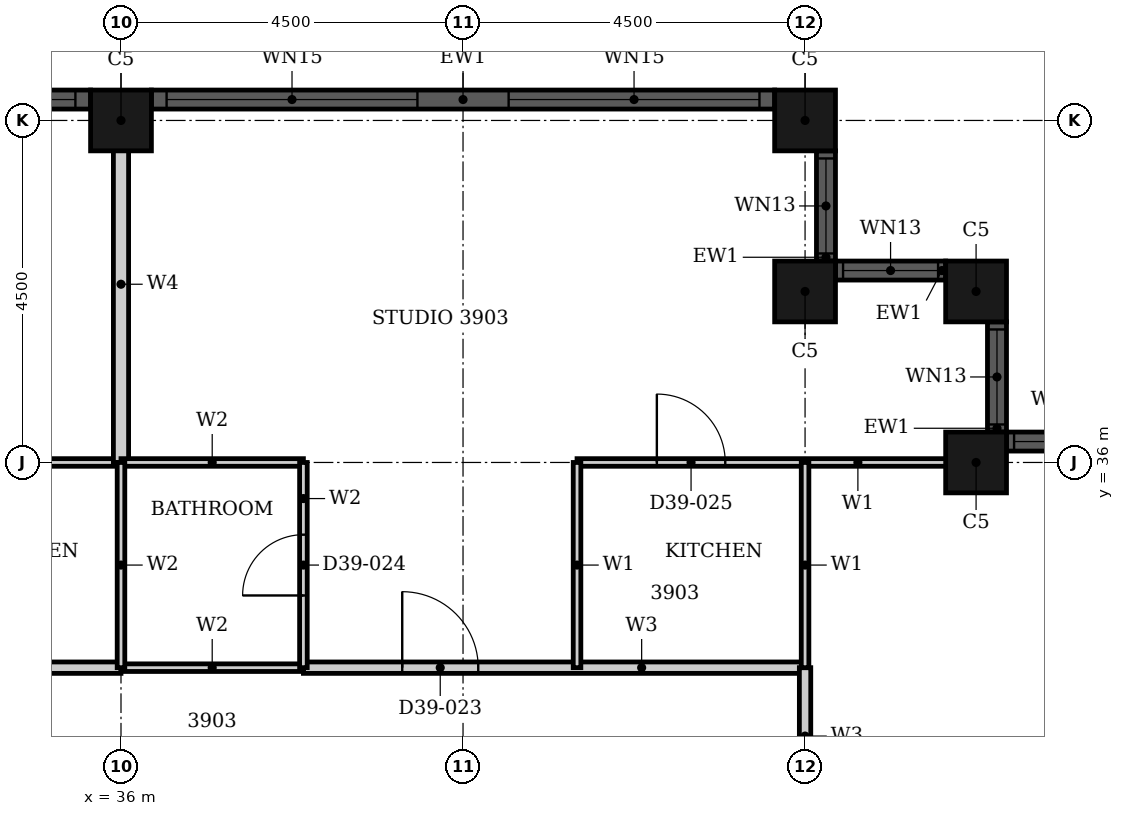
"""IFC4 building model, lengths in metres.
Left out: names, types, materials, properties, quantities, classifications, styles, units other than length and angle.
Written with IfcOpenShell. Run it as: python <this file> out.ifc"""

import sys

from ifc_helpers import new_model, si_unit, direction, frame, frame_2d, origin, origin_2d, place, context, subcontext, project, spatial, rectangle, hollow_rectangle, extrude, element, fill, save


model = new_model("IFC4")
c1 = context("Model", 3, precision=1e-05, world=origin(), true_north=direction((0.0, 1.0)))
c2 = subcontext(c1, "Body", "Model", "MODEL_VIEW")
j1 = project(units=[si_unit("LENGTHUNIT", "METRE"), si_unit("PLANEANGLEUNIT", "RADIAN")], contexts=[c1])
p1 = place(None, origin())
s1 = spatial("IfcSite", under=j1, at=p1, CompositionType="ELEMENT")
p2 = place(p1, origin())
s2 = spatial("IfcBuilding", under=s1, at=p2, CompositionType="ELEMENT")
p3 = place(p2, frame((0.0, 0.0, 158.0)))
s3 = spatial("IfcBuildingStorey", under=s2, at=p3, CompositionType="ELEMENT", Elevation=158.0)
for number, where, z_axis, x_axis in (
    (1, (47.25, 36.0, 0.0), (0.0, 0.0, 1.0), (1.0, 0.0, 0.0)),
    (2, (47.25, 38.25, 0.0), (0.0, 0.0, 1.0), (1.0, 0.0, 0.0)),
    (3, (45.0, 38.25, 0.0), (0.0, 0.0, 1.0), (1.0, 0.0, 0.0)),
    (4, (45.0, 40.5, 0.0), (0.0, 0.0, 1.0), (1.0, 0.0, 0.0)),
    (5, (36.0, 40.5, 0.0), (0.0, 0.0, 1.0), (1.0, 0.0, 0.0)),
):
    element("IfcColumn", number, at=place(p3, frame(where, z_axis=z_axis, x_axis=x_axis)), inside=s3, PredefinedType="COLUMN", context=c2, shape_type="SweptSolid", body=[
        extrude(hollow_rectangle(XDim=0.8, YDim=0.8, WallThickness=0.025, at=origin_2d()), origin(), (0.0, 0.0, 1.0), 3.7),
    ])
p4 = place(p3, frame((49.1, 36.275, 0.0), z_axis=(0.0, 0.0, 1.0), x_axis=(-1.0, 0.0, 0.0)))
e6 = element("IfcWall", 6, at=p4, inside=s3, PredefinedType="SOLIDWALL", context=c2, shape_type="SweptSolid", body=[
    extrude(rectangle(XDim=1.45, YDim=0.25, at=frame_2d((0.725, 0.0))), origin(), (0.0, 0.0, 1.0), 3.7),
])
p5 = place(p4, frame((0.1, 0.0, 0.9)))
e7 = element("IfcOpeningElement", 7, at=p5, cuts=e6, PredefinedType="OPENING", context=c2, shape_type="SweptSolid", body=[
    extrude(rectangle(XDim=1.25, YDim=1.85, at=frame_2d((0.625, 0.925))), frame((0.0, 0.135, 0.0), z_axis=(0.0, -1.0, 0.0), x_axis=(1.0, 0.0, 0.0)), (0.0, 0.0, 1.0), 0.27),
])
p6 = place(p3, frame((47.525, 36.4, 0.0), z_axis=(0.0, 0.0, 1.0), x_axis=(0.0, 1.0, 0.0)))
e8 = element("IfcWall", 8, at=p6, inside=s3, PredefinedType="SOLIDWALL", context=c2, shape_type="SweptSolid", body=[
    extrude(rectangle(XDim=1.45, YDim=0.25, at=frame_2d((0.725, 0.0))), origin(), (0.0, 0.0, 1.0), 3.7),
])
p7 = place(p6, frame((0.1, 0.0, 0.9)))
e9 = element("IfcOpeningElement", 9, at=p7, cuts=e8, PredefinedType="OPENING", context=c2, shape_type="SweptSolid", body=[
    extrude(rectangle(XDim=1.25, YDim=1.85, at=frame_2d((0.625, 0.925))), frame((0.0, 0.135, 0.0), z_axis=(0.0, -1.0, 0.0), x_axis=(1.0, 0.0, 0.0)), (0.0, 0.0, 1.0), 0.27),
])
p8 = place(p3, frame((46.85, 38.525, 0.0), z_axis=(0.0, 0.0, 1.0), x_axis=(-1.0, 0.0, 0.0)))
e10 = element("IfcWall", 10, at=p8, inside=s3, PredefinedType="SOLIDWALL", context=c2, shape_type="SweptSolid", body=[
    extrude(rectangle(XDim=1.45, YDim=0.25, at=frame_2d((0.725, 0.0))), origin(), (0.0, 0.0, 1.0), 3.7),
])
p9 = place(p8, frame((0.1, 0.0, 0.9)))
e11 = element("IfcOpeningElement", 11, at=p9, cuts=e10, PredefinedType="OPENING", context=c2, shape_type="SweptSolid", body=[
    extrude(rectangle(XDim=1.25, YDim=1.85, at=frame_2d((0.625, 0.925))), frame((0.0, 0.135, 0.0), z_axis=(0.0, -1.0, 0.0), x_axis=(1.0, 0.0, 0.0)), (0.0, 0.0, 1.0), 0.27),
])
p10 = place(p3, frame((45.275, 38.65, 0.0), z_axis=(0.0, 0.0, 1.0), x_axis=(0.0, 1.0, 0.0)))
e12 = element("IfcWall", 12, at=p10, inside=s3, PredefinedType="SOLIDWALL", context=c2, shape_type="SweptSolid", body=[
    extrude(rectangle(XDim=1.45, YDim=0.25, at=frame_2d((0.725, 0.0))), origin(), (0.0, 0.0, 1.0), 3.7),
])
p11 = place(p10, frame((0.1, 0.0, 0.9)))
e13 = element("IfcOpeningElement", 13, at=p11, cuts=e12, PredefinedType="OPENING", context=c2, shape_type="SweptSolid", body=[
    extrude(rectangle(XDim=1.25, YDim=1.85, at=frame_2d((0.625, 0.925))), frame((0.0, 0.135, 0.0), z_axis=(0.0, -1.0, 0.0), x_axis=(1.0, 0.0, 0.0)), (0.0, 0.0, 1.0), 0.27),
])
p12 = place(p3, frame((44.6, 40.775, 0.0), z_axis=(0.0, 0.0, 1.0), x_axis=(-1.0, 0.0, 0.0)))
e14 = element("IfcWall", 14, at=p12, inside=s3, PredefinedType="SOLIDWALL", context=c2, shape_type="SweptSolid", body=[
    extrude(rectangle(XDim=8.2, YDim=0.25, at=frame_2d((4.1, 0.0))), origin(), (0.0, 0.0, 1.0), 3.7),
])
p13 = place(p12, frame((0.2, 0.0, 0.45)))
e15 = element("IfcOpeningElement", 15, at=p13, cuts=e14, PredefinedType="OPENING", context=c2, shape_type="SweptSolid", body=[
    extrude(rectangle(XDim=3.3, YDim=2.3, at=frame_2d((1.65, 1.15))), frame((0.0, 0.135, 0.0), z_axis=(0.0, -1.0, 0.0), x_axis=(1.0, 0.0, 0.0)), (0.0, 0.0, 1.0), 0.27),
])
p14 = place(p12, frame((4.7, 0.0, 0.45)))
e16 = element("IfcOpeningElement", 16, at=p14, cuts=e14, PredefinedType="OPENING", context=c2, shape_type="SweptSolid", body=[
    extrude(rectangle(XDim=3.3, YDim=2.3, at=frame_2d((1.65, 1.15))), frame((0.0, 0.135, 0.0), z_axis=(0.0, -1.0, 0.0), x_axis=(1.0, 0.0, 0.0)), (0.0, 0.0, 1.0), 0.27),
])
p15 = place(p3, frame((35.6, 40.775, 0.0), z_axis=(0.0, 0.0, 1.0), x_axis=(-1.0, 0.0, 0.0)))
e17 = element("IfcWall", 17, at=p15, inside=s3, PredefinedType="SOLIDWALL", context=c2, shape_type="SweptSolid", body=[
    extrude(rectangle(XDim=8.2, YDim=0.25, at=frame_2d((4.1, 0.0))), origin(), (0.0, 0.0, 1.0), 3.7),
])
p16 = place(p15, frame((0.2, 0.0, 0.45)))
e18 = element("IfcOpeningElement", 18, at=p16, cuts=e17, PredefinedType="OPENING", context=c2, shape_type="SweptSolid", body=[
    extrude(rectangle(XDim=3.3, YDim=2.3, at=frame_2d((1.65, 1.15))), frame((0.0, 0.135, 0.0), z_axis=(0.0, -1.0, 0.0), x_axis=(1.0, 0.0, 0.0)), (0.0, 0.0, 1.0), 0.27),
])
p17 = place(p15, frame((4.7, 0.0, 0.45)))
e19 = element("IfcOpeningElement", 19, at=p17, cuts=e17, PredefinedType="OPENING", context=c2, shape_type="SweptSolid", body=[
    extrude(rectangle(XDim=3.3, YDim=2.3, at=frame_2d((1.65, 1.15))), frame((0.0, 0.135, 0.0), z_axis=(0.0, -1.0, 0.0), x_axis=(1.0, 0.0, 0.0)), (0.0, 0.0, 1.0), 0.27),
])
p18 = place(p3, frame((29.4, 33.3, 0.0), z_axis=(0.0, 0.0, 1.0), x_axis=(1.0, 0.0, 0.0)))
e20 = element("IfcWall", 20, at=p18, inside=s3, PredefinedType="PARTITIONING", context=c2, shape_type="SweptSolid", body=[
    extrude(rectangle(XDim=6.6, YDim=0.15, at=frame_2d((3.3, 0.0))), origin(), (0.0, 0.0, 1.0), 3.4),
])
p19 = place(p18, frame((1.3, 0.0, 0.0)))
e21 = element("IfcOpeningElement", 21, at=p19, cuts=e20, PredefinedType="OPENING", context=c2, shape_type="SweptSolid", body=[
    extrude(rectangle(XDim=1.0, YDim=2.2, at=frame_2d((0.5, 1.1))), frame((0.0, 0.085, 0.0), z_axis=(0.0, -1.0, 0.0), x_axis=(1.0, 0.0, 0.0)), (0.0, 0.0, 1.0), 0.17),
])
p20 = place(p3, frame((38.4, 33.3, 0.0), z_axis=(0.0, 0.0, 1.0), x_axis=(1.0, 0.0, 0.0)))
e22 = element("IfcWall", 22, at=p20, inside=s3, PredefinedType="PARTITIONING", context=c2, shape_type="SweptSolid", body=[
    extrude(rectangle(XDim=6.6, YDim=0.15, at=frame_2d((3.3, 0.0))), origin(), (0.0, 0.0, 1.0), 3.4),
])
p21 = place(p20, frame((1.3, 0.0, 0.0)))
e23 = element("IfcOpeningElement", 23, at=p21, cuts=e22, PredefinedType="OPENING", context=c2, shape_type="SweptSolid", body=[
    extrude(rectangle(XDim=1.0, YDim=2.2, at=frame_2d((0.5, 1.1))), frame((0.0, 0.085, 0.0), z_axis=(0.0, -1.0, 0.0), x_axis=(1.0, 0.0, 0.0)), (0.0, 0.0, 1.0), 0.17),
])
p22 = place(p3, frame((45.0, 31.5, 0.0), z_axis=(0.0, 0.0, 1.0), x_axis=(0.0, 1.0, 0.0)))
e24 = element("IfcWall", 24, at=p22, inside=s3, PredefinedType="PARTITIONING", context=c2, shape_type="SweptSolid", body=[
    extrude(rectangle(XDim=1.8, YDim=0.15, at=frame_2d((0.9, 0.0))), origin(), (0.0, 0.0, 1.0), 3.4),
])
p23 = place(p3, frame((33.0, 36.0, 0.0), z_axis=(0.0, 0.0, 1.0), x_axis=(1.0, 0.0, 0.0)))
e25 = element("IfcWall", 25, at=p23, inside=s3, PredefinedType="PARTITIONING", context=c2, shape_type="SweptSolid", body=[
    extrude(rectangle(XDim=3.0, YDim=0.1, at=frame_2d((1.5, 0.0))), origin(), (0.0, 0.0, 1.0), 3.4),
])
p24 = place(p23, frame((1.05, 0.0, 0.0)))
e26 = element("IfcOpeningElement", 26, at=p24, cuts=e25, PredefinedType="OPENING", context=c2, shape_type="SweptSolid", body=[
    extrude(rectangle(XDim=0.9, YDim=2.1, at=frame_2d((0.45, 1.05))), frame((0.0, 0.06, 0.0), z_axis=(0.0, -1.0, 0.0), x_axis=(1.0, 0.0, 0.0)), (0.0, 0.0, 1.0), 0.12),
])
p25 = place(p3, frame((42.0, 36.0, 0.0), z_axis=(0.0, 0.0, 1.0), x_axis=(1.0, 0.0, 0.0)))
e27 = element("IfcWall", 27, at=p25, inside=s3, PredefinedType="PARTITIONING", context=c2, shape_type="SweptSolid", body=[
    extrude(rectangle(XDim=5.44, YDim=0.1, at=frame_2d((2.72, 0.0))), origin(), (0.0, 0.0, 1.0), 3.4),
])
p26 = place(p25, frame((1.05, 0.0, 0.0)))
e28 = element("IfcOpeningElement", 28, at=p26, cuts=e27, PredefinedType="OPENING", context=c2, shape_type="SweptSolid", body=[
    extrude(rectangle(XDim=0.9, YDim=2.1, at=frame_2d((0.45, 1.05))), frame((0.0, 0.06, 0.0), z_axis=(0.0, -1.0, 0.0), x_axis=(1.0, 0.0, 0.0)), (0.0, 0.0, 1.0), 0.12),
])
for number, where, z_axis, x_axis in (
    (29, (42.0, 33.3, 0.0), (0.0, 0.0, 1.0), (0.0, 1.0, 0.0)),
    (30, (45.0, 33.3, 0.0), (0.0, 0.0, 1.0), (0.0, 1.0, 0.0)),
):
    element("IfcWall", number, at=place(p3, frame(where, z_axis=z_axis, x_axis=x_axis)), inside=s3, PredefinedType="PARTITIONING", context=c2, shape_type="SweptSolid", body=[
        extrude(rectangle(XDim=2.7, YDim=0.1, at=frame_2d((1.35, 0.0))), origin(), (0.0, 0.0, 1.0), 3.4),
    ])
p27 = place(p3, frame((36.0, 36.0, 0.0), z_axis=(0.0, 0.0, 1.0), x_axis=(0.0, 1.0, 0.0)))
e31 = element("IfcWall", 31, at=p27, inside=s3, PredefinedType="PARTITIONING", context=c2, shape_type="SweptSolid", body=[
    extrude(rectangle(XDim=4.69, YDim=0.2, at=frame_2d((2.345, 0.0))), origin(), (0.0, 0.0, 1.0), 3.4),
])
for number, where, z_axis, x_axis in (
    (32, (36.0, 33.3, 0.0), (0.0, 0.0, 1.0), (1.0, 0.0, 0.0)),
    (33, (36.0, 36.0, 0.0), (0.0, 0.0, 1.0), (1.0, 0.0, 0.0)),
):
    element("IfcWall", number, at=place(p3, frame(where, z_axis=z_axis, x_axis=x_axis)), inside=s3, PredefinedType="PARTITIONING", context=c2, shape_type="SweptSolid", body=[
        extrude(rectangle(XDim=2.4, YDim=0.1, at=frame_2d((1.2, 0.0))), origin(), (0.0, 0.0, 1.0), 3.4),
    ])
p28 = place(p3, frame((36.0, 33.3, 0.0), z_axis=(0.0, 0.0, 1.0), x_axis=(0.0, 1.0, 0.0)))
e34 = element("IfcWall", 34, at=p28, inside=s3, PredefinedType="PARTITIONING", context=c2, shape_type="SweptSolid", body=[
    extrude(rectangle(XDim=2.7, YDim=0.1, at=frame_2d((1.35, 0.0))), origin(), (0.0, 0.0, 1.0), 3.4),
])
p29 = place(p3, frame((38.4, 33.3, 0.0), z_axis=(0.0, 0.0, 1.0), x_axis=(0.0, 1.0, 0.0)))
e35 = element("IfcWall", 35, at=p29, inside=s3, PredefinedType="PARTITIONING", context=c2, shape_type="SweptSolid", body=[
    extrude(rectangle(XDim=2.7, YDim=0.1, at=frame_2d((1.35, 0.0))), origin(), (0.0, 0.0, 1.0), 3.4),
])
p30 = place(p29, frame((0.95, 0.0, 0.0)))
e36 = element("IfcOpeningElement", 36, at=p30, cuts=e35, PredefinedType="OPENING", context=c2, shape_type="SweptSolid", body=[
    extrude(rectangle(XDim=0.8, YDim=2.1, at=frame_2d((0.4, 1.05))), frame((0.0, 0.06, 0.0), z_axis=(0.0, -1.0, 0.0), x_axis=(1.0, 0.0, 0.0)), (0.0, 0.0, 1.0), 0.12),
])
p31 = place(p5, origin())
e37 = element("IfcWindow", 37, at=p31, inside=s3, PartitioningType="SINGLE_PANEL", PredefinedType="WINDOW", context=c2, shape_type="SweptSolid", body=[
    extrude(rectangle(XDim=1.25, YDim=1.85, at=frame_2d((0.625, 0.925))), frame((0.0, 0.03, 0.0), z_axis=(0.0, -1.0, 0.0), x_axis=(1.0, 0.0, 0.0)), (0.0, 0.0, 1.0), 0.06),
])
fill(e7, e37)
p32 = place(p7, origin())
e38 = element("IfcWindow", 38, at=p32, inside=s3, PartitioningType="SINGLE_PANEL", PredefinedType="WINDOW", context=c2, shape_type="SweptSolid", body=[
    extrude(rectangle(XDim=1.25, YDim=1.85, at=frame_2d((0.625, 0.925))), frame((0.0, 0.03, 0.0), z_axis=(0.0, -1.0, 0.0), x_axis=(1.0, 0.0, 0.0)), (0.0, 0.0, 1.0), 0.06),
])
fill(e9, e38)
p33 = place(p9, origin())
e39 = element("IfcWindow", 39, at=p33, inside=s3, PartitioningType="SINGLE_PANEL", PredefinedType="WINDOW", context=c2, shape_type="SweptSolid", body=[
    extrude(rectangle(XDim=1.25, YDim=1.85, at=frame_2d((0.625, 0.925))), frame((0.0, 0.03, 0.0), z_axis=(0.0, -1.0, 0.0), x_axis=(1.0, 0.0, 0.0)), (0.0, 0.0, 1.0), 0.06),
])
fill(e11, e39)
p34 = place(p11, origin())
e40 = element("IfcWindow", 40, at=p34, inside=s3, PartitioningType="SINGLE_PANEL", PredefinedType="WINDOW", context=c2, shape_type="SweptSolid", body=[
    extrude(rectangle(XDim=1.25, YDim=1.85, at=frame_2d((0.625, 0.925))), frame((0.0, 0.03, 0.0), z_axis=(0.0, -1.0, 0.0), x_axis=(1.0, 0.0, 0.0)), (0.0, 0.0, 1.0), 0.06),
])
fill(e13, e40)
p35 = place(p13, origin())
e41 = element("IfcWindow", 41, at=p35, inside=s3, PartitioningType="SINGLE_PANEL", PredefinedType="WINDOW", context=c2, shape_type="SweptSolid", body=[
    extrude(rectangle(XDim=3.3, YDim=2.3, at=frame_2d((1.65, 1.15))), frame((0.0, 0.03, 0.0), z_axis=(0.0, -1.0, 0.0), x_axis=(1.0, 0.0, 0.0)), (0.0, 0.0, 1.0), 0.06),
])
fill(e15, e41)
p36 = place(p14, origin())
e42 = element("IfcWindow", 42, at=p36, inside=s3, PartitioningType="SINGLE_PANEL", PredefinedType="WINDOW", context=c2, shape_type="SweptSolid", body=[
    extrude(rectangle(XDim=3.3, YDim=2.3, at=frame_2d((1.65, 1.15))), frame((0.0, 0.03, 0.0), z_axis=(0.0, -1.0, 0.0), x_axis=(1.0, 0.0, 0.0)), (0.0, 0.0, 1.0), 0.06),
])
fill(e16, e42)
p37 = place(p16, origin())
e43 = element("IfcWindow", 43, at=p37, inside=s3, PartitioningType="SINGLE_PANEL", PredefinedType="WINDOW", context=c2, shape_type="SweptSolid", body=[
    extrude(rectangle(XDim=3.3, YDim=2.3, at=frame_2d((1.65, 1.15))), frame((0.0, 0.03, 0.0), z_axis=(0.0, -1.0, 0.0), x_axis=(1.0, 0.0, 0.0)), (0.0, 0.0, 1.0), 0.06),
])
fill(e18, e43)
p38 = place(p21, origin())
e44 = element("IfcDoor", 44, at=p38, inside=s3, OperationType="SINGLE_SWING_LEFT", PredefinedType="DOOR", context=c2, shape_type="SweptSolid", body=[
    extrude(rectangle(XDim=1.0, YDim=2.2, at=frame_2d((0.5, 1.1))), frame((0.0, 0.025, 0.0), z_axis=(0.0, -1.0, 0.0), x_axis=(1.0, 0.0, 0.0)), (0.0, 0.0, 1.0), 0.05),
])
fill(e23, e44)
p39 = place(p30, origin())
e45 = element("IfcDoor", 45, at=p39, inside=s3, OperationType="SINGLE_SWING_RIGHT", PredefinedType="DOOR", context=c2, shape_type="SweptSolid", body=[
    extrude(rectangle(XDim=0.8, YDim=2.1, at=frame_2d((0.4, 1.05))), frame((0.0, 0.025, 0.0), z_axis=(0.0, -1.0, 0.0), x_axis=(1.0, 0.0, 0.0)), (0.0, 0.0, 1.0), 0.05),
])
fill(e36, e45)
p40 = place(p26, origin())
e46 = element("IfcDoor", 46, at=p40, inside=s3, OperationType="SINGLE_SWING_LEFT", PredefinedType="DOOR", context=c2, shape_type="SweptSolid", body=[
    extrude(rectangle(XDim=0.9, YDim=2.1, at=frame_2d((0.45, 1.05))), frame((0.0, 0.025, 0.0), z_axis=(0.0, -1.0, 0.0), x_axis=(1.0, 0.0, 0.0)), (0.0, 0.0, 1.0), 0.05),
])
fill(e28, e46)
save(model, sys.argv[1])
